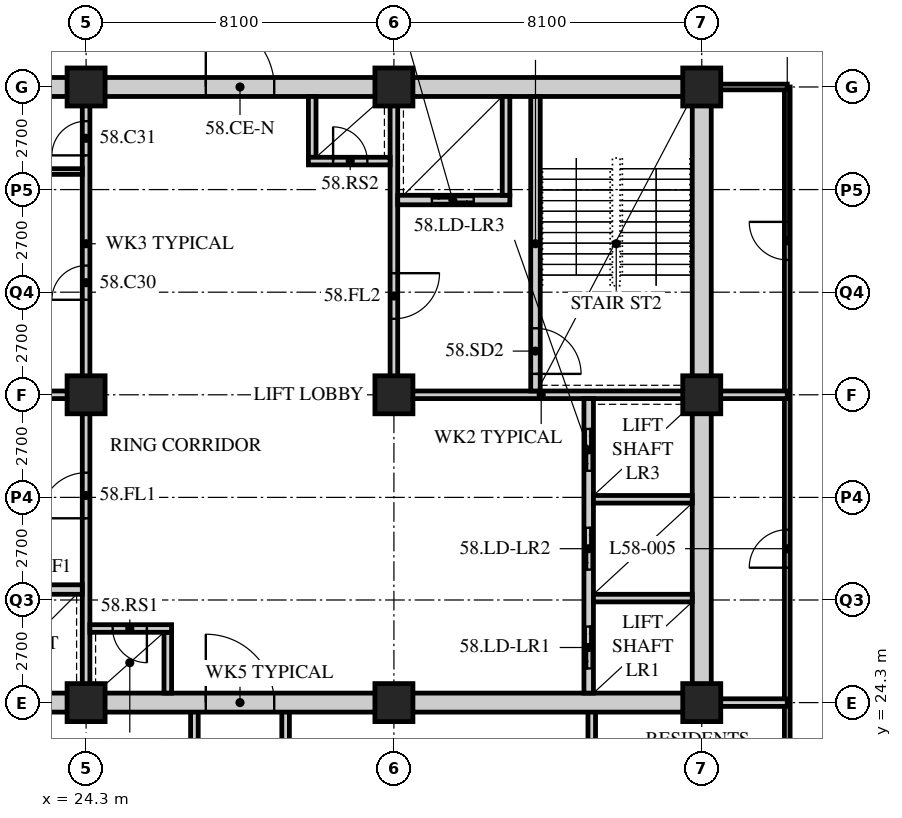
"""IFC4 building model, lengths in metres.
Left out: names, types, materials, properties, quantities, classifications, styles, units other than length and angle.
Written with IfcOpenShell. Run it as: python <this file> out.ifc"""

import sys

from ifc_helpers import new_model, si_unit, direction, frame, frame_2d, origin, origin_2d, place, context, subcontext, project, spatial, rectangle, hollow_rectangle, extrude, element, fill, save


model = new_model("IFC4")
c1 = context("Model", 3, precision=1e-05, world=origin(), true_north=direction((0.0, 1.0)))
c2 = subcontext(c1, "Body", "Model", "MODEL_VIEW")
j1 = project(units=[si_unit("LENGTHUNIT", "METRE"), si_unit("PLANEANGLEUNIT", "RADIAN")], contexts=[c1])
p1 = place(None, origin())
s1 = spatial("IfcSite", under=j1, at=p1, CompositionType="ELEMENT")
p2 = place(p1, origin())
s2 = spatial("IfcBuilding", under=s1, at=p2, CompositionType="ELEMENT")
p3 = place(p2, frame((0.0, 0.0, 224.4)))
s3 = spatial("IfcBuildingStorey", under=s2, at=p3, CompositionType="ELEMENT", Elevation=224.4)
for number, where, z_axis, x_axis in (
    (1, (24.3, 24.3, 0.0), (0.0, 0.0, 1.0), (1.0, 0.0, 0.0)),
    (2, (24.3, 32.4, 0.0), (0.0, 0.0, 1.0), (1.0, 0.0, 0.0)),
    (3, (24.3, 40.5, 0.0), (0.0, 0.0, 1.0), (1.0, 0.0, 0.0)),
    (4, (32.4, 24.3, 0.0), (0.0, 0.0, 1.0), (1.0, 0.0, 0.0)),
    (5, (32.4, 32.4, 0.0), (0.0, 0.0, 1.0), (1.0, 0.0, 0.0)),
    (6, (32.4, 40.5, 0.0), (0.0, 0.0, 1.0), (1.0, 0.0, 0.0)),
    (7, (40.5, 24.3, 0.0), (0.0, 0.0, 1.0), (1.0, 0.0, 0.0)),
    (8, (40.5, 32.4, 0.0), (0.0, 0.0, 1.0), (1.0, 0.0, 0.0)),
    (9, (40.5, 40.5, 0.0), (0.0, 0.0, 1.0), (1.0, 0.0, 0.0)),
):
    element("IfcColumn", number, at=place(p3, frame(where, z_axis=z_axis, x_axis=x_axis)), inside=s3, PredefinedType="COLUMN", context=c2, shape_type="SweptSolid", body=[
        extrude(hollow_rectangle(XDim=1.0, YDim=1.0, WallThickness=0.1, at=origin_2d()), origin(), (0.0, 0.0, 1.0), 3.6),
    ])
p4 = place(p3, frame((42.75, 20.7, 0.0), z_axis=(0.0, 0.0, 1.0), x_axis=(0.0, 1.0, 0.0)))
e10 = element("IfcWall", 10, at=p4, inside=s3, PredefinedType="PARTITIONING", context=c2, shape_type="SweptSolid", body=[
    extrude(rectangle(XDim=19.8, YDim=0.15, at=frame_2d((9.9, 0.0))), origin(), (0.0, 0.0, 1.0), 3.39),
])
p5 = place(p4, frame((7.15, 0.0, 0.0)))
e11 = element("IfcOpeningElement", 11, at=p5, cuts=e10, PredefinedType="OPENING", context=c2, shape_type="SweptSolid", body=[
    extrude(rectangle(XDim=1.0, YDim=2.1, at=frame_2d((0.5, 1.05))), frame((0.0, 0.085, 0.0), z_axis=(0.0, -1.0, 0.0), x_axis=(1.0, 0.0, 0.0)), (0.0, 0.0, 1.0), 0.17),
])
p6 = place(p4, frame((15.25, 0.0, 0.0)))
e12 = element("IfcOpeningElement", 12, at=p6, cuts=e10, PredefinedType="OPENING", context=c2, shape_type="SweptSolid", body=[
    extrude(rectangle(XDim=1.0, YDim=2.1, at=frame_2d((0.5, 1.05))), frame((0.0, 0.085, 0.0), z_axis=(0.0, -1.0, 0.0), x_axis=(1.0, 0.0, 0.0)), (0.0, 0.0, 1.0), 0.17),
])
p7 = place(p3, frame((42.75, 40.5, 0.0), z_axis=(0.0, 0.0, 1.0), x_axis=(-1.0, 0.0, 0.0)))
e13 = element("IfcWall", 13, at=p7, inside=s3, PredefinedType="PARTITIONING", context=c2, shape_type="SweptSolid", body=[
    extrude(rectangle(XDim=2.05, YDim=0.15, at=frame_2d((1.025, 0.0))), origin(), (0.0, 0.0, 1.0), 3.39),
])
p8 = place(p3, frame((40.5, 32.4, 0.0), z_axis=(0.0, 0.0, 1.0), x_axis=(1.0, 0.0, 0.0)))
e14 = element("IfcWall", 14, at=p8, inside=s3, PredefinedType="SOLIDWALL", context=c2, shape_type="SweptSolid", body=[
    extrude(rectangle(XDim=2.25, YDim=0.2, at=frame_2d((1.125, 0.0))), origin(), (0.0, 0.0, 1.0), 3.39),
])
for number, where, z_axis, x_axis in (
    (15, (37.606, 20.7, 0.0), (0.0, 0.0, 1.0), (0.0, 1.0, 0.0)),
    (16, (27.15, 20.7, 0.0), (0.0, 0.0, 1.0), (0.0, 1.0, 0.0)),
    (17, (29.55, 20.7, 0.0), (0.0, 0.0, 1.0), (0.0, 1.0, 0.0)),
):
    element("IfcWall", number, at=place(p3, frame(where, z_axis=z_axis, x_axis=x_axis)), inside=s3, PredefinedType="SOLIDWALL", context=c2, shape_type="SweptSolid", body=[
        extrude(rectangle(XDim=3.6, YDim=0.2, at=frame_2d((1.8, 0.0))), origin(), (0.0, 0.0, 1.0), 3.39),
    ])
p9 = place(p3, frame((40.5, 24.3, 0.0), z_axis=(0.0, 0.0, 1.0), x_axis=(1.0, 0.0, 0.0)))
e18 = element("IfcWall", 18, at=p9, inside=s3, PredefinedType="SOLIDWALL", context=c2, shape_type="SweptSolid", body=[
    extrude(rectangle(XDim=2.25, YDim=0.2, at=frame_2d((1.125, 0.0))), origin(), (0.0, 0.0, 1.0), 3.39),
])
p10 = place(p3, frame((15.95, 24.3, 0.0), z_axis=(0.0, 0.0, 1.0), x_axis=(1.0, 0.0, 0.0)))
e19 = element("IfcWall", 19, at=p10, inside=s3, PredefinedType="SOLIDWALL", context=c2, shape_type="SweptSolid", body=[
    extrude(rectangle(XDim=24.8, YDim=0.5, at=frame_2d((12.4, 0.0))), origin(), (0.0, 0.0, 1.0), 2.628),
])
p11 = place(p10, frame((11.5, 0.0, 0.0)))
e20 = element("IfcOpeningElement", 20, at=p11, cuts=e19, PredefinedType="OPENING", context=c2, shape_type="SweptSolid", body=[
    extrude(rectangle(XDim=1.8, YDim=2.4, at=frame_2d((0.9, 1.2))), frame((0.0, 0.26, 0.0), z_axis=(0.0, -1.0, 0.0), x_axis=(1.0, 0.0, 0.0)), (0.0, 0.0, 1.0), 0.52),
])
p12 = place(p3, frame((15.95, 40.5, 0.0), z_axis=(0.0, 0.0, 1.0), x_axis=(1.0, 0.0, 0.0)))
e21 = element("IfcWall", 21, at=p12, inside=s3, PredefinedType="SOLIDWALL", context=c2, shape_type="SweptSolid", body=[
    extrude(rectangle(XDim=24.8, YDim=0.5, at=frame_2d((12.4, 0.0))), origin(), (0.0, 0.0, 1.0), 2.628),
])
p13 = place(p12, frame((11.5, 0.0, 0.0)))
e22 = element("IfcOpeningElement", 22, at=p13, cuts=e21, PredefinedType="OPENING", context=c2, shape_type="SweptSolid", body=[
    extrude(rectangle(XDim=1.8, YDim=2.4, at=frame_2d((0.9, 1.2))), frame((0.0, 0.26, 0.0), z_axis=(0.0, -1.0, 0.0), x_axis=(1.0, 0.0, 0.0)), (0.0, 0.0, 1.0), 0.52),
])
p14 = place(p3, frame((40.5, 24.55, 0.0), z_axis=(0.0, 0.0, 1.0), x_axis=(0.0, 1.0, 0.0)))
e23 = element("IfcWall", 23, at=p14, inside=s3, PredefinedType="SOLIDWALL", context=c2, shape_type="SweptSolid", body=[
    extrude(rectangle(XDim=15.7, YDim=0.5, at=frame_2d((7.85, 0.0))), origin(), (0.0, 0.0, 1.0), 2.628),
])
p15 = place(p3, frame((16.45, 32.4, 0.0), z_axis=(0.0, 0.0, 1.0), x_axis=(1.0, 0.0, 0.0)))
e24 = element("IfcWall", 24, at=p15, inside=s3, PredefinedType="SOLIDWALL", context=c2, shape_type="SweptSolid", body=[
    extrude(rectangle(XDim=7.95, YDim=0.2, at=frame_2d((3.975, 0.0))), origin(), (0.0, 0.0, 1.0), 2.778),
])
p16 = place(p3, frame((24.3, 24.55, 0.0), z_axis=(0.0, 0.0, 1.0), x_axis=(0.0, 1.0, 0.0)))
e25 = element("IfcWall", 25, at=p16, inside=s3, PredefinedType="SOLIDWALL", context=c2, shape_type="SweptSolid", body=[
    extrude(rectangle(XDim=7.75, YDim=0.2, at=frame_2d((3.875, 0.0))), origin(), (0.0, 0.0, 1.0), 2.778),
])
p17 = place(p16, frame((4.6, 0.0, 0.0)))
e26 = element("IfcOpeningElement", 26, at=p17, cuts=e25, PredefinedType="OPENING", context=c2, shape_type="SweptSolid", body=[
    extrude(rectangle(XDim=1.2, YDim=2.1, at=frame_2d((0.6, 1.05))), frame((0.0, 0.11, 0.0), z_axis=(0.0, -1.0, 0.0), x_axis=(1.0, 0.0, 0.0)), (0.0, 0.0, 1.0), 0.22),
])
p18 = place(p3, frame((21.25, 27.275, 0.0), z_axis=(0.0, 0.0, 1.0), x_axis=(1.0, 0.0, 0.0)))
e27 = element("IfcWall", 27, at=p18, inside=s3, PredefinedType="SOLIDWALL", context=c2, shape_type="SweptSolid", body=[
    extrude(rectangle(XDim=2.95, YDim=0.25, at=frame_2d((1.475, 0.0))), origin(), (0.0, 0.0, 1.0), 3.39),
])
p19 = place(p18, frame((0.95, 0.0, 0.0)))
e28 = element("IfcOpeningElement", 28, at=p19, cuts=e27, PredefinedType="OPENING", context=c2, shape_type="SweptSolid", body=[
    extrude(rectangle(XDim=1.1, YDim=2.4, at=frame_2d((0.55, 1.2))), frame((0.0, 0.135, 0.0), z_axis=(0.0, -1.0, 0.0), x_axis=(1.0, 0.0, 0.0)), (0.0, 0.0, 1.0), 0.27),
])
p20 = place(p3, frame((26.45, 24.55, 0.0), z_axis=(0.0, 0.0, 1.0), x_axis=(0.0, 1.0, 0.0)))
e29 = element("IfcWall", 29, at=p20, inside=s3, PredefinedType="SOLIDWALL", context=c2, shape_type="SweptSolid", body=[
    extrude(rectangle(XDim=1.6, YDim=0.2, at=frame_2d((0.8, 0.0))), origin(), (0.0, 0.0, 1.0), 3.39),
])
p21 = place(p3, frame((24.4, 26.25, 0.0), z_axis=(0.0, 0.0, 1.0), x_axis=(1.0, 0.0, 0.0)))
e30 = element("IfcWall", 30, at=p21, inside=s3, PredefinedType="SOLIDWALL", context=c2, shape_type="SweptSolid", body=[
    extrude(rectangle(XDim=2.15, YDim=0.2, at=frame_2d((1.075, 0.0))), origin(), (0.0, 0.0, 1.0), 3.39),
])
p22 = place(p21, frame((0.6, 0.0, 0.0)))
e31 = element("IfcOpeningElement", 31, at=p22, cuts=e30, PredefinedType="OPENING", context=c2, shape_type="SweptSolid", body=[
    extrude(rectangle(XDim=0.9, YDim=2.1, at=frame_2d((0.45, 1.05))), frame((0.0, 0.11, 0.0), z_axis=(0.0, -1.0, 0.0), x_axis=(1.0, 0.0, 0.0)), (0.0, 0.0, 1.0), 0.22),
])
p23 = place(p3, frame((32.3, 32.4, 0.0), z_axis=(0.0, 0.0, 1.0), x_axis=(1.0, 0.0, 0.0)))
e32 = element("IfcWall", 32, at=p23, inside=s3, PredefinedType="SOLIDWALL", context=c2, shape_type="SweptSolid", body=[
    extrude(rectangle(XDim=7.95, YDim=0.2, at=frame_2d((3.975, 0.0))), origin(), (0.0, 0.0, 1.0), 2.778),
])
p24 = place(p3, frame((32.4, 32.5, 0.0), z_axis=(0.0, 0.0, 1.0), x_axis=(0.0, 1.0, 0.0)))
e33 = element("IfcWall", 33, at=p24, inside=s3, PredefinedType="SOLIDWALL", context=c2, shape_type="SweptSolid", body=[
    extrude(rectangle(XDim=7.75, YDim=0.2, at=frame_2d((3.875, 0.0))), origin(), (0.0, 0.0, 1.0), 2.778),
])
p25 = place(p24, frame((1.9, 0.0, 0.0)))
e34 = element("IfcOpeningElement", 34, at=p25, cuts=e33, PredefinedType="OPENING", context=c2, shape_type="SweptSolid", body=[
    extrude(rectangle(XDim=1.2, YDim=2.1, at=frame_2d((0.6, 1.05))), frame((0.0, 0.11, 0.0), z_axis=(0.0, -1.0, 0.0), x_axis=(1.0, 0.0, 0.0)), (0.0, 0.0, 1.0), 0.22),
])
p26 = place(p3, frame((37.525, 24.55, 0.0), z_axis=(0.0, 0.0, 1.0), x_axis=(0.0, 1.0, 0.0)))
e35 = element("IfcWall", 35, at=p26, inside=s3, PredefinedType="SOLIDWALL", context=c2, shape_type="SweptSolid", body=[
    extrude(rectangle(XDim=7.75, YDim=0.25, at=frame_2d((3.875, 0.0))), origin(), (0.0, 0.0, 1.0), 3.39),
])
p27 = place(p26, frame((0.65, 0.0, 0.0)))
e36 = element("IfcOpeningElement", 36, at=p27, cuts=e35, PredefinedType="OPENING", context=c2, shape_type="SweptSolid", body=[
    extrude(rectangle(XDim=1.1, YDim=2.4, at=frame_2d((0.55, 1.2))), frame((0.0, 0.135, 0.0), z_axis=(0.0, -1.0, 0.0), x_axis=(1.0, 0.0, 0.0)), (0.0, 0.0, 1.0), 0.27),
])
p28 = place(p26, frame((3.25, 0.0, 0.0)))
e37 = element("IfcOpeningElement", 37, at=p28, cuts=e35, PredefinedType="OPENING", context=c2, shape_type="SweptSolid", body=[
    extrude(rectangle(XDim=1.1, YDim=2.4, at=frame_2d((0.55, 1.2))), frame((0.0, 0.135, 0.0), z_axis=(0.0, -1.0, 0.0), x_axis=(1.0, 0.0, 0.0)), (0.0, 0.0, 1.0), 0.27),
])
p29 = place(p26, frame((5.85, 0.0, 0.0)))
e38 = element("IfcOpeningElement", 38, at=p29, cuts=e35, PredefinedType="OPENING", context=c2, shape_type="SweptSolid", body=[
    extrude(rectangle(XDim=1.1, YDim=2.4, at=frame_2d((0.55, 1.2))), frame((0.0, 0.135, 0.0), z_axis=(0.0, -1.0, 0.0), x_axis=(1.0, 0.0, 0.0)), (0.0, 0.0, 1.0), 0.27),
])
for number, where, z_axis, x_axis in (
    (39, (37.65, 27.05, 0.0), (0.0, 0.0, 1.0), (1.0, 0.0, 0.0)),
    (40, (37.65, 29.65, 0.0), (0.0, 0.0, 1.0), (1.0, 0.0, 0.0)),
):
    element("IfcWall", number, at=place(p3, frame(where, z_axis=z_axis, x_axis=x_axis)), inside=s3, PredefinedType="SOLIDWALL", context=c2, shape_type="SweptSolid", body=[
        extrude(rectangle(XDim=2.6, YDim=0.2, at=frame_2d((1.3, 0.0))), origin(), (0.0, 0.0, 1.0), 3.39),
    ])
p30 = place(p3, frame((36.125, 32.5, 0.0), z_axis=(0.0, 0.0, 1.0), x_axis=(0.0, 1.0, 0.0)))
e41 = element("IfcWall", 41, at=p30, inside=s3, PredefinedType="SOLIDWALL", context=c2, shape_type="SweptSolid", body=[
    extrude(rectangle(XDim=7.75, YDim=0.25, at=frame_2d((3.875, 0.0))), origin(), (0.0, 0.0, 1.0), 3.39),
])
p31 = place(p30, frame((0.45, 0.0, 0.0)))
e42 = element("IfcOpeningElement", 42, at=p31, cuts=e41, PredefinedType="OPENING", context=c2, shape_type="SweptSolid", body=[
    extrude(rectangle(XDim=1.2, YDim=2.1, at=frame_2d((0.6, 1.05))), frame((0.0, 0.135, 0.0), z_axis=(0.0, -1.0, 0.0), x_axis=(1.0, 0.0, 0.0)), (0.0, 0.0, 1.0), 0.27),
])
p32 = place(p3, frame((32.5, 37.525, 0.0), z_axis=(0.0, 0.0, 1.0), x_axis=(1.0, 0.0, 0.0)))
e43 = element("IfcWall", 43, at=p32, inside=s3, PredefinedType="SOLIDWALL", context=c2, shape_type="SweptSolid", body=[
    extrude(rectangle(XDim=2.95, YDim=0.25, at=frame_2d((1.475, 0.0))), origin(), (0.0, 0.0, 1.0), 3.39),
])
p33 = place(p32, frame((0.9, 0.0, 0.0)))
e44 = element("IfcOpeningElement", 44, at=p33, cuts=e43, PredefinedType="OPENING", context=c2, shape_type="SweptSolid", body=[
    extrude(rectangle(XDim=1.1, YDim=2.4, at=frame_2d((0.55, 1.2))), frame((0.0, 0.135, 0.0), z_axis=(0.0, -1.0, 0.0), x_axis=(1.0, 0.0, 0.0)), (0.0, 0.0, 1.0), 0.27),
])
p34 = place(p3, frame((35.35, 37.65, 0.0), z_axis=(0.0, 0.0, 1.0), x_axis=(0.0, 1.0, 0.0)))
e45 = element("IfcWall", 45, at=p34, inside=s3, PredefinedType="SOLIDWALL", context=c2, shape_type="SweptSolid", body=[
    extrude(rectangle(XDim=2.6, YDim=0.2, at=frame_2d((1.3, 0.0))), origin(), (0.0, 0.0, 1.0), 3.39),
])
p35 = place(p3, frame((30.25, 38.65, 0.0), z_axis=(0.0, 0.0, 1.0), x_axis=(0.0, 1.0, 0.0)))
e46 = element("IfcWall", 46, at=p35, inside=s3, PredefinedType="SOLIDWALL", context=c2, shape_type="SweptSolid", body=[
    extrude(rectangle(XDim=1.6, YDim=0.2, at=frame_2d((0.8, 0.0))), origin(), (0.0, 0.0, 1.0), 3.39),
])
p36 = place(p3, frame((30.15, 38.55, 0.0), z_axis=(0.0, 0.0, 1.0), x_axis=(1.0, 0.0, 0.0)))
e47 = element("IfcWall", 47, at=p36, inside=s3, PredefinedType="SOLIDWALL", context=c2, shape_type="SweptSolid", body=[
    extrude(rectangle(XDim=2.15, YDim=0.2, at=frame_2d((1.075, 0.0))), origin(), (0.0, 0.0, 1.0), 3.39),
])
p37 = place(p36, frame((0.65, 0.0, 0.0)))
e48 = element("IfcOpeningElement", 48, at=p37, cuts=e47, PredefinedType="OPENING", context=c2, shape_type="SweptSolid", body=[
    extrude(rectangle(XDim=0.9, YDim=2.1, at=frame_2d((0.45, 1.05))), frame((0.0, 0.11, 0.0), z_axis=(0.0, -1.0, 0.0), x_axis=(1.0, 0.0, 0.0)), (0.0, 0.0, 1.0), 0.22),
])
p38 = place(p3, frame((24.3, 32.5, 0.0), z_axis=(0.0, 0.0, 1.0), x_axis=(0.0, 1.0, 0.0)))
e49 = element("IfcWall", 49, at=p38, inside=s3, PredefinedType="PARTITIONING", context=c2, shape_type="SweptSolid", body=[
    extrude(rectangle(XDim=7.75, YDim=0.2, at=frame_2d((3.875, 0.0))), origin(), (0.0, 0.0, 1.0), 2.778),
])
p39 = place(p38, frame((2.4, 0.0, 0.0)))
e50 = element("IfcOpeningElement", 50, at=p39, cuts=e49, PredefinedType="OPENING", context=c2, shape_type="SweptSolid", body=[
    extrude(rectangle(XDim=0.9, YDim=2.1, at=frame_2d((0.45, 1.05))), frame((0.0, 0.11, 0.0), z_axis=(0.0, -1.0, 0.0), x_axis=(1.0, 0.0, 0.0)), (0.0, 0.0, 1.0), 0.22),
])
p40 = place(p38, frame((6.2, 0.0, 0.0)))
e51 = element("IfcOpeningElement", 51, at=p40, cuts=e49, PredefinedType="OPENING", context=c2, shape_type="SweptSolid", body=[
    extrude(rectangle(XDim=0.9, YDim=2.1, at=frame_2d((0.45, 1.05))), frame((0.0, 0.11, 0.0), z_axis=(0.0, -1.0, 0.0), x_axis=(1.0, 0.0, 0.0)), (0.0, 0.0, 1.0), 0.22),
])
p41 = place(p3, frame((16.45, 38.275, 0.0), z_axis=(0.0, 0.0, 1.0), x_axis=(1.0, 0.0, 0.0)))
e52 = element("IfcWall", 52, at=p41, inside=s3, PredefinedType="PARTITIONING", context=c2, shape_type="SweptSolid", body=[
    extrude(rectangle(XDim=7.75, YDim=0.15, at=frame_2d((3.875, 0.0))), origin(), (0.0, 0.0, 1.0), 3.39),
])
p42 = place(p5, origin())
e53 = element("IfcDoor", 53, at=p42, inside=s3, OperationType="SINGLE_SWING_LEFT", PredefinedType="DOOR", context=c2, shape_type="SweptSolid", body=[
    extrude(rectangle(XDim=1.0, YDim=2.1, at=frame_2d((0.5, 1.05))), frame((0.0, 0.025, 0.0), z_axis=(0.0, -1.0, 0.0), x_axis=(1.0, 0.0, 0.0)), (0.0, 0.0, 1.0), 0.05),
])
fill(e11, e53)
p43 = place(p6, origin())
e54 = element("IfcDoor", 54, at=p43, inside=s3, OperationType="SINGLE_SWING_RIGHT", PredefinedType="DOOR", context=c2, shape_type="SweptSolid", body=[
    extrude(rectangle(XDim=1.0, YDim=2.1, at=frame_2d((0.5, 1.05))), frame((0.0, 0.025, 0.0), z_axis=(0.0, -1.0, 0.0), x_axis=(1.0, 0.0, 0.0)), (0.0, 0.0, 1.0), 0.05),
])
fill(e12, e54)
p44 = place(p39, origin())
e55 = element("IfcDoor", 55, at=p44, inside=s3, OperationType="SINGLE_SWING_LEFT", PredefinedType="DOOR", context=c2, shape_type="SweptSolid", body=[
    extrude(rectangle(XDim=0.9, YDim=2.1, at=frame_2d((0.45, 1.05))), frame((0.0, 0.025, 0.0), z_axis=(0.0, -1.0, 0.0), x_axis=(1.0, 0.0, 0.0)), (0.0, 0.0, 1.0), 0.05),
])
fill(e50, e55)
p45 = place(p40, origin())
e56 = element("IfcDoor", 56, at=p45, inside=s3, OperationType="SINGLE_SWING_LEFT", PredefinedType="DOOR", context=c2, shape_type="SweptSolid", body=[
    extrude(rectangle(XDim=0.9, YDim=2.1, at=frame_2d((0.45, 1.05))), frame((0.0, 0.025, 0.0), z_axis=(0.0, -1.0, 0.0), x_axis=(1.0, 0.0, 0.0)), (0.0, 0.0, 1.0), 0.05),
])
fill(e51, e56)
p46 = place(p17, origin())
e57 = element("IfcDoor", 57, at=p46, inside=s3, OperationType="SINGLE_SWING_LEFT", PredefinedType="DOOR", context=c2, shape_type="SweptSolid", body=[
    extrude(rectangle(XDim=1.2, YDim=2.1, at=frame_2d((0.6, 1.05))), frame((0.0, 0.025, 0.0), z_axis=(0.0, -1.0, 0.0), x_axis=(1.0, 0.0, 0.0)), (0.0, 0.0, 1.0), 0.05),
])
fill(e26, e57)
p47 = place(p22, origin())
e58 = element("IfcDoor", 58, at=p47, inside=s3, OperationType="SINGLE_SWING_LEFT", PredefinedType="DOOR", context=c2, shape_type="SweptSolid", body=[
    extrude(rectangle(XDim=0.9, YDim=2.1, at=frame_2d((0.45, 1.05))), frame((0.0, 0.025, 0.0), z_axis=(0.0, -1.0, 0.0), x_axis=(1.0, 0.0, 0.0)), (0.0, 0.0, 1.0), 0.05),
])
fill(e31, e58)
p48 = place(p31, origin())
e59 = element("IfcDoor", 59, at=p48, inside=s3, OperationType="SINGLE_SWING_RIGHT", PredefinedType="DOOR", context=c2, shape_type="SweptSolid", body=[
    extrude(rectangle(XDim=1.2, YDim=2.1, at=frame_2d((0.6, 1.05))), frame((0.0, 0.025, 0.0), z_axis=(0.0, -1.0, 0.0), x_axis=(1.0, 0.0, 0.0)), (0.0, 0.0, 1.0), 0.05),
])
fill(e42, e59)
p49 = place(p25, origin())
e60 = element("IfcDoor", 60, at=p49, inside=s3, OperationType="SINGLE_SWING_LEFT", PredefinedType="DOOR", context=c2, shape_type="SweptSolid", body=[
    extrude(rectangle(XDim=1.2, YDim=2.1, at=frame_2d((0.6, 1.05))), frame((0.0, 0.025, 0.0), z_axis=(0.0, -1.0, 0.0), x_axis=(1.0, 0.0, 0.0)), (0.0, 0.0, 1.0), 0.05),
])
fill(e34, e60)
p50 = place(p37, origin())
e61 = element("IfcDoor", 61, at=p50, inside=s3, OperationType="SINGLE_SWING_LEFT", PredefinedType="DOOR", context=c2, shape_type="SweptSolid", body=[
    extrude(rectangle(XDim=0.9, YDim=2.1, at=frame_2d((0.45, 1.05))), frame((0.0, 0.025, 0.0), z_axis=(0.0, -1.0, 0.0), x_axis=(1.0, 0.0, 0.0)), (0.0, 0.0, 1.0), 0.05),
])
fill(e48, e61)
p51 = place(p27, origin())
e62 = element("IfcDoor", 62, at=p51, inside=s3, OperationType="DOUBLE_DOOR_SLIDING", PredefinedType="DOOR", context=c2, shape_type="SweptSolid", body=[
    extrude(rectangle(XDim=1.1, YDim=2.4, at=frame_2d((0.55, 1.2))), frame((0.0, 0.025, 0.0), z_axis=(0.0, -1.0, 0.0), x_axis=(1.0, 0.0, 0.0)), (0.0, 0.0, 1.0), 0.05),
])
fill(e36, e62)
p52 = place(p28, origin())
e63 = element("IfcDoor", 63, at=p52, inside=s3, OperationType="DOUBLE_DOOR_SLIDING", PredefinedType="DOOR", context=c2, shape_type="SweptSolid", body=[
    extrude(rectangle(XDim=1.1, YDim=2.4, at=frame_2d((0.55, 1.2))), frame((0.0, 0.025, 0.0), z_axis=(0.0, -1.0, 0.0), x_axis=(1.0, 0.0, 0.0)), (0.0, 0.0, 1.0), 0.05),
])
fill(e37, e63)
p53 = place(p29, origin())
e64 = element("IfcDoor", 64, at=p53, inside=s3, OperationType="DOUBLE_DOOR_SLIDING", PredefinedType="DOOR", context=c2, shape_type="SweptSolid", body=[
    extrude(rectangle(XDim=1.1, YDim=2.4, at=frame_2d((0.55, 1.2))), frame((0.0, 0.025, 0.0), z_axis=(0.0, -1.0, 0.0), x_axis=(1.0, 0.0, 0.0)), (0.0, 0.0, 1.0), 0.05),
])
fill(e38, e64)
p54 = place(p33, origin())
e65 = element("IfcDoor", 65, at=p54, inside=s3, OperationType="DOUBLE_DOOR_SLIDING", PredefinedType="DOOR", context=c2, shape_type="SweptSolid", body=[
    extrude(rectangle(XDim=1.1, YDim=2.4, at=frame_2d((0.55, 1.2))), frame((0.0, 0.025, 0.0), z_axis=(0.0, -1.0, 0.0), x_axis=(1.0, 0.0, 0.0)), (0.0, 0.0, 1.0), 0.05),
])
fill(e44, e65)
p55 = place(p11, origin())
e66 = element("IfcDoor", 66, at=p55, inside=s3, OperationType="DOUBLE_DOOR_SINGLE_SWING", PredefinedType="DOOR", context=c2, shape_type="SweptSolid", body=[
    extrude(rectangle(XDim=1.8, YDim=2.4, at=frame_2d((0.9, 1.2))), frame((0.0, 0.025, 0.0), z_axis=(0.0, -1.0, 0.0), x_axis=(1.0, 0.0, 0.0)), (0.0, 0.0, 1.0), 0.05),
])
fill(e20, e66)
p56 = place(p13, origin())
e67 = element("IfcDoor", 67, at=p56, inside=s3, OperationType="DOUBLE_DOOR_SINGLE_SWING", PredefinedType="DOOR", context=c2, shape_type="SweptSolid", body=[
    extrude(rectangle(XDim=1.8, YDim=2.4, at=frame_2d((0.9, 1.2))), frame((0.0, 0.025, 0.0), z_axis=(0.0, -1.0, 0.0), x_axis=(1.0, 0.0, 0.0)), (0.0, 0.0, 1.0), 0.05),
])
fill(e22, e67)
save(model, sys.argv[1])
